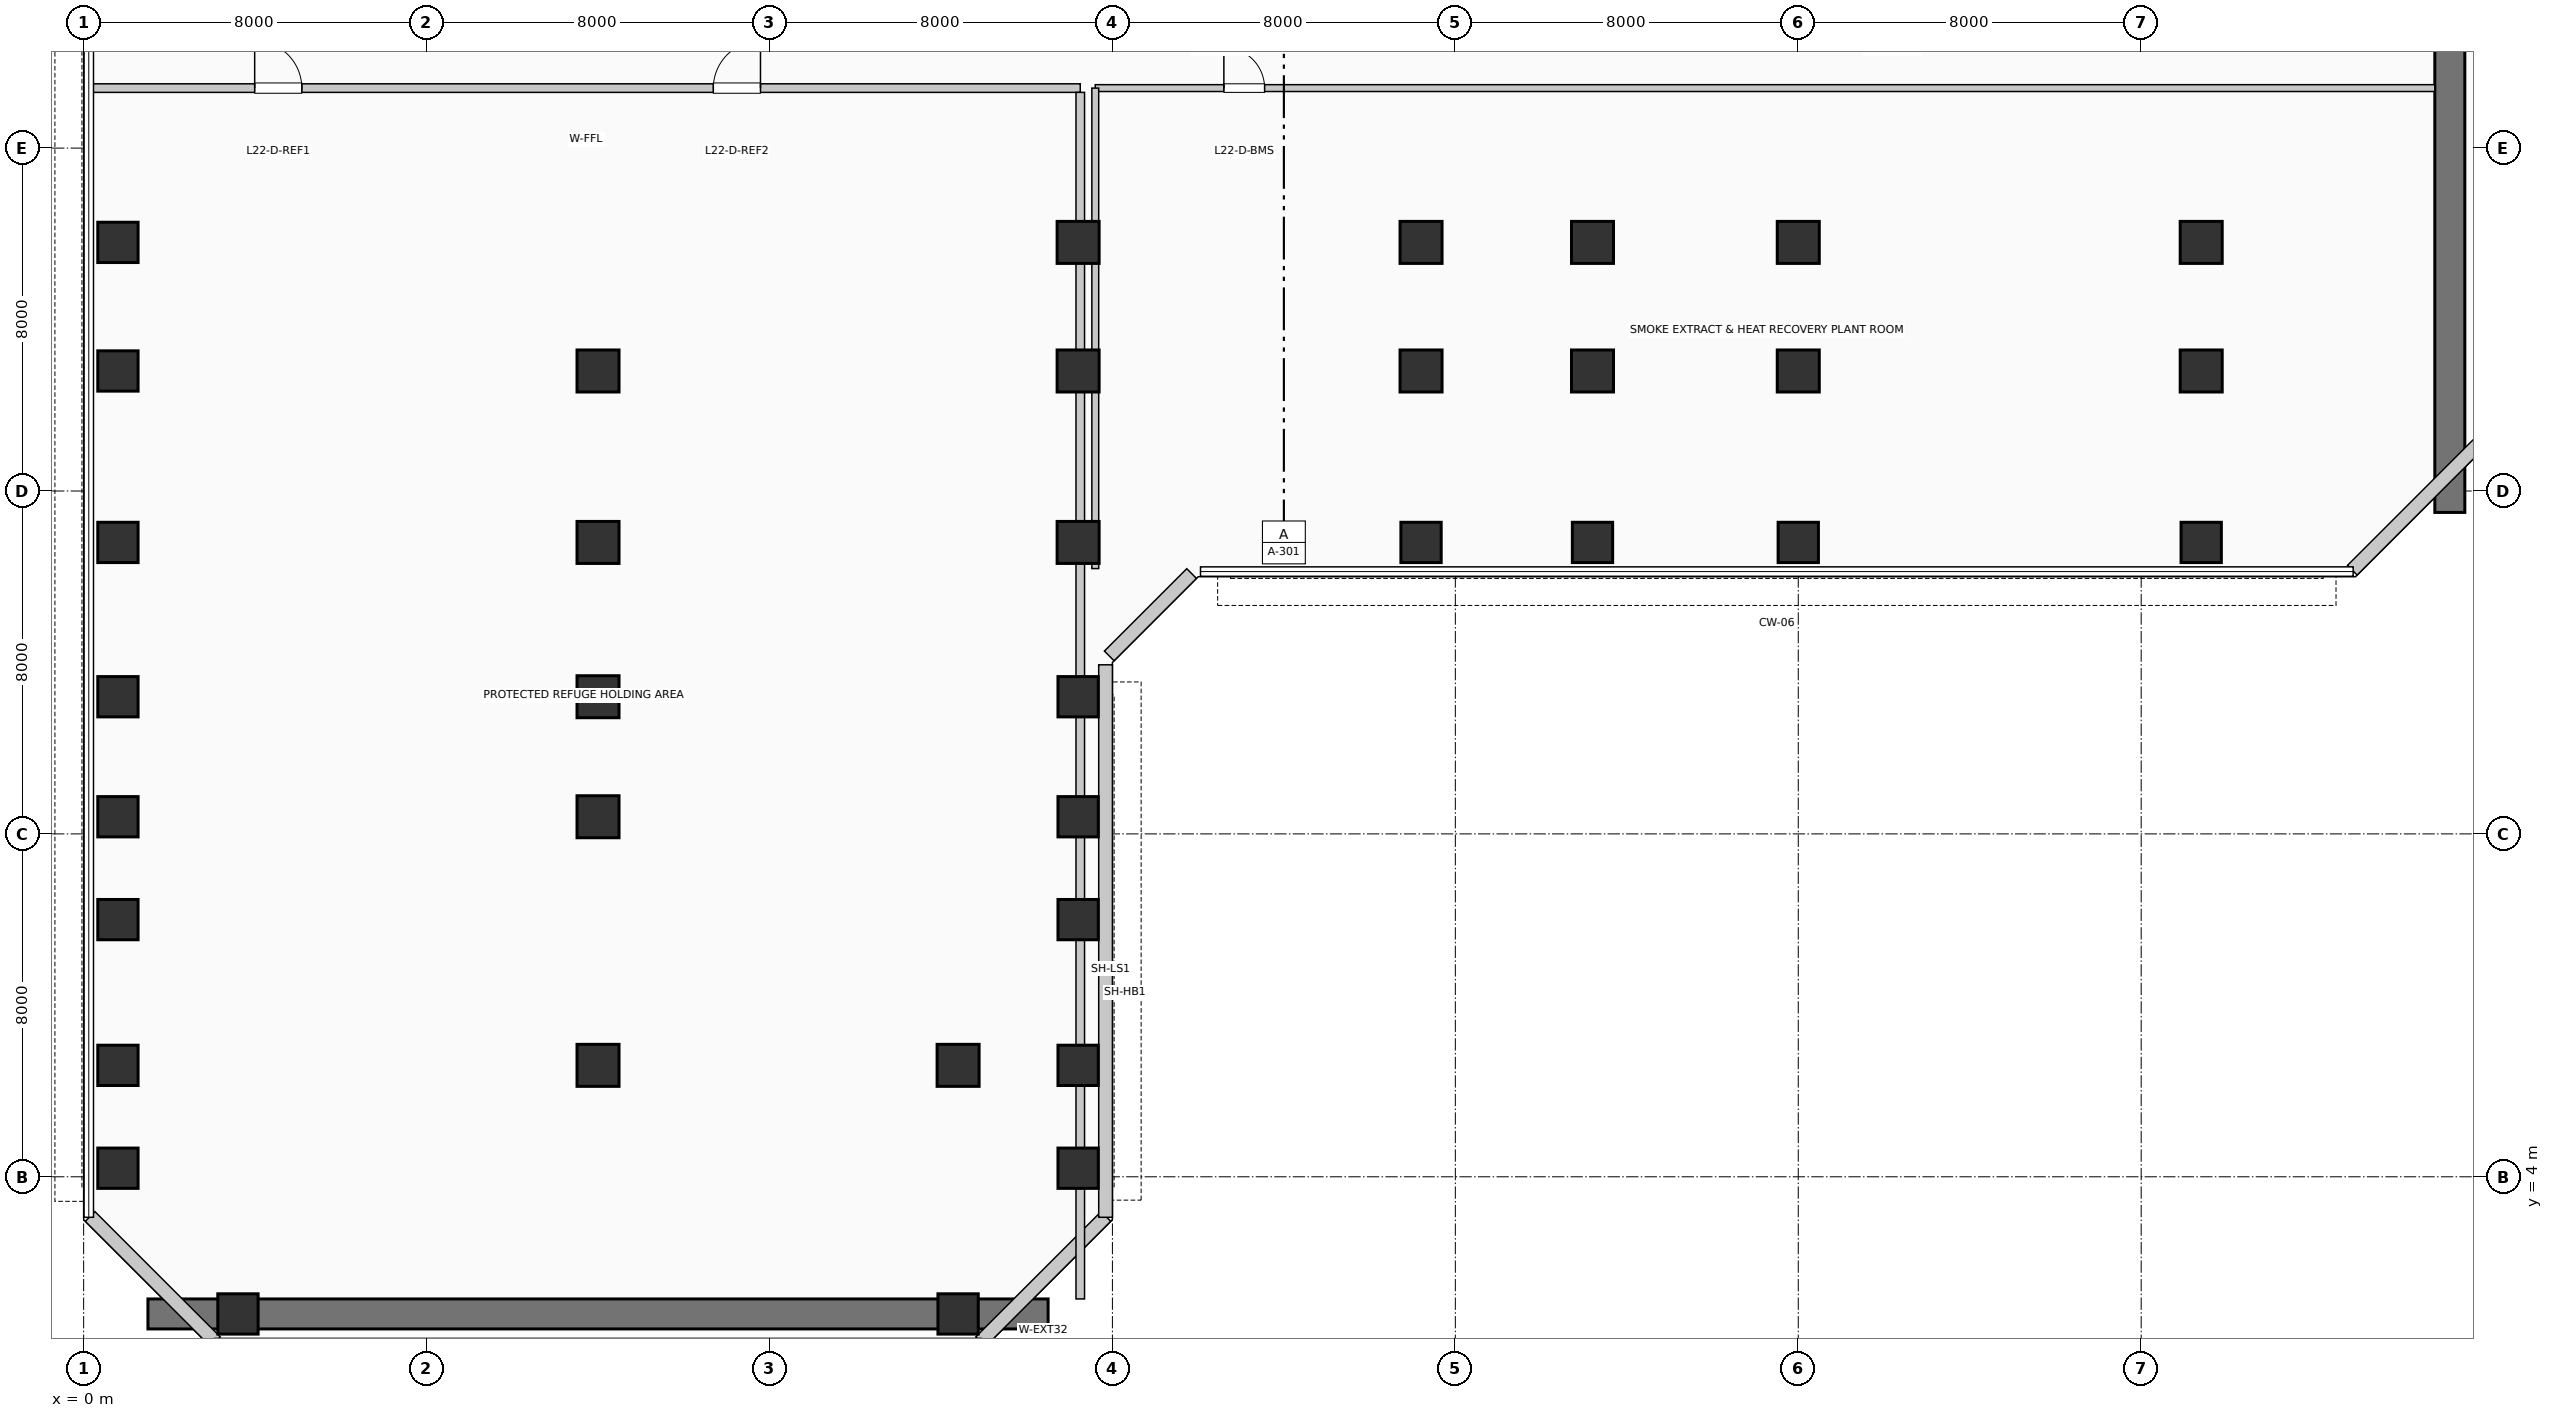
"""IFC4 building model, lengths in metres.
Left out: names, types, materials, properties, quantities, classifications, styles, units other than length and angle.
Written with IfcOpenShell. Run it as: python <this file> out.ifc"""

import sys

from ifc_helpers import new_model, si_unit, direction, frame, frame_2d, origin, origin_2d, place, context, subcontext, project, spatial, rectangle, extrude, element, fill, save


model = new_model("IFC4")
c1 = context("Model", 3, precision=1e-05, world=origin(), true_north=direction((0.0, 1.0)))
c2 = subcontext(c1, "Body", "Model", "MODEL_VIEW")
j1 = project(units=[si_unit("LENGTHUNIT", "METRE"), si_unit("PLANEANGLEUNIT", "RADIAN")], contexts=[c1])
p1 = place(None, origin())
s1 = spatial("IfcSite", under=j1, at=p1, CompositionType="ELEMENT")
p2 = place(p1, origin())
s2 = spatial("IfcBuilding", under=s1, at=p2, CompositionType="ELEMENT")
p3 = place(p2, frame((0.0, 0.0, 93.72)))
s3 = spatial("IfcBuildingStorey", under=s2, at=p3, CompositionType="ELEMENT", Elevation=93.72)
p4 = place(p3, frame((1.5, 0.8, 0.0), z_axis=(0.0, 0.0, 1.0), x_axis=(1.0, 0.0, 0.0)))
e1 = element("IfcWall", 1, at=p4, inside=s3, PredefinedType="SHEAR", context=c2, shape_type="SweptSolid", body=[
    extrude(rectangle(XDim=21.0, YDim=0.7, at=frame_2d((10.5, 0.0))), origin(), (0.0, 0.0, 1.0), 4.3),
])
p5 = place(p3, frame((55.2, 19.5, 0.0), z_axis=(0.0, 0.0, 1.0), x_axis=(0.0, 1.0, 0.0)))
e2 = element("IfcWall", 2, at=p5, inside=s3, PredefinedType="SHEAR", context=c2, shape_type="SweptSolid", body=[
    extrude(rectangle(XDim=24.9, YDim=0.7, at=frame_2d((12.45, 0.0))), origin(), (0.0, 0.0, 1.0), 4.3),
])
for number, where, z_axis, x_axis in (
    (3, (0.8, 4.2, 0.0), (0.0, 0.0, 1.0), (1.0, 0.0, 0.0)),
    (4, (0.8, 6.6, 0.0), (0.0, 0.0, 1.0), (1.0, 0.0, 0.0)),
    (5, (0.8, 10.0, 0.0), (0.0, 0.0, 1.0), (1.0, 0.0, 0.0)),
    (6, (0.8, 12.4, 0.0), (0.0, 0.0, 1.0), (1.0, 0.0, 0.0)),
    (7, (0.8, 15.2, 0.0), (0.0, 0.0, 1.0), (1.0, 0.0, 0.0)),
    (8, (0.8, 18.8, 0.0), (0.0, 0.0, 1.0), (1.0, 0.0, 0.0)),
    (9, (0.8, 22.8, 0.0), (0.0, 0.0, 1.0), (1.0, 0.0, 0.0)),
    (10, (0.8, 25.8, 0.0), (0.0, 0.0, 1.0), (1.0, 0.0, 0.0)),
    (11, (3.6, 0.8, 0.0), (0.0, 0.0, 1.0), (1.0, 0.0, 0.0)),
):
    element("IfcColumn", number, at=place(p3, frame(where, z_axis=z_axis, x_axis=x_axis)), inside=s3, PredefinedType="COLUMN", context=c2, shape_type="SweptSolid", body=[
        extrude(rectangle(XDim=0.94, YDim=0.94, at=origin_2d()), origin(), (0.0, 0.0, 1.0), 4.95),
    ])
for number, where, z_axis, x_axis in (
    (12, (12.0, 6.6, 0.0), (0.0, 0.0, 1.0), (1.0, 0.0, 0.0)),
    (13, (12.0, 12.4, 0.0), (0.0, 0.0, 1.0), (1.0, 0.0, 0.0)),
    (14, (12.0, 15.2, 0.0), (0.0, 0.0, 1.0), (1.0, 0.0, 0.0)),
    (15, (12.0, 18.8, 0.0), (0.0, 0.0, 1.0), (1.0, 0.0, 0.0)),
    (16, (12.0, 22.8, 0.0), (0.0, 0.0, 1.0), (1.0, 0.0, 0.0)),
):
    element("IfcColumn", number, at=place(p3, frame(where, z_axis=z_axis, x_axis=x_axis)), inside=s3, PredefinedType="COLUMN", context=c2, shape_type="SweptSolid", body=[
        extrude(rectangle(XDim=0.98, YDim=0.98, at=origin_2d()), origin(), (0.0, 0.0, 1.0), 4.95),
    ])
p6 = place(p3, frame((20.4, 0.8, 0.0), z_axis=(0.0, 0.0, 1.0), x_axis=(1.0, 0.0, 0.0)))
e17 = element("IfcColumn", 17, at=p6, inside=s3, PredefinedType="COLUMN", context=c2, shape_type="SweptSolid", body=[
    extrude(rectangle(XDim=0.94, YDim=0.94, at=origin_2d()), origin(), (0.0, 0.0, 1.0), 4.95),
])
p7 = place(p3, frame((20.4, 6.6, 0.0), z_axis=(0.0, 0.0, 1.0), x_axis=(1.0, 0.0, 0.0)))
e18 = element("IfcColumn", 18, at=p7, inside=s3, PredefinedType="COLUMN", context=c2, shape_type="SweptSolid", body=[
    extrude(rectangle(XDim=0.98, YDim=0.98, at=origin_2d()), origin(), (0.0, 0.0, 1.0), 4.95),
])
for number, where, z_axis, x_axis in (
    (19, (23.2, 4.2, 0.0), (0.0, 0.0, 1.0), (1.0, 0.0, 0.0)),
    (20, (23.2, 6.6, 0.0), (0.0, 0.0, 1.0), (1.0, 0.0, 0.0)),
    (21, (23.2, 10.0, 0.0), (0.0, 0.0, 1.0), (1.0, 0.0, 0.0)),
    (22, (23.2, 12.4, 0.0), (0.0, 0.0, 1.0), (1.0, 0.0, 0.0)),
    (23, (23.2, 15.2, 0.0), (0.0, 0.0, 1.0), (1.0, 0.0, 0.0)),
):
    element("IfcColumn", number, at=place(p3, frame(where, z_axis=z_axis, x_axis=x_axis)), inside=s3, PredefinedType="COLUMN", context=c2, shape_type="SweptSolid", body=[
        extrude(rectangle(XDim=0.94, YDim=0.94, at=origin_2d()), origin(), (0.0, 0.0, 1.0), 4.95),
    ])
for number, where, z_axis, x_axis in (
    (24, (23.2, 18.8, 0.0), (0.0, 0.0, 1.0), (1.0, 0.0, 0.0)),
    (25, (23.2, 22.8, 0.0), (0.0, 0.0, 1.0), (1.0, 0.0, 0.0)),
    (26, (23.2, 25.8, 0.0), (0.0, 0.0, 1.0), (1.0, 0.0, 0.0)),
):
    element("IfcColumn", number, at=place(p3, frame(where, z_axis=z_axis, x_axis=x_axis)), inside=s3, PredefinedType="COLUMN", context=c2, shape_type="SweptSolid", body=[
        extrude(rectangle(XDim=0.98, YDim=0.98, at=origin_2d()), origin(), (0.0, 0.0, 1.0), 4.95),
    ])
p8 = place(p3, frame((31.2, 18.8, 0.0), z_axis=(0.0, 0.0, 1.0), x_axis=(1.0, 0.0, 0.0)))
e27 = element("IfcColumn", 27, at=p8, inside=s3, PredefinedType="COLUMN", context=c2, shape_type="SweptSolid", body=[
    extrude(rectangle(XDim=0.94, YDim=0.94, at=origin_2d()), origin(), (0.0, 0.0, 1.0), 4.95),
])
for number, where, z_axis, x_axis in (
    (28, (31.2, 22.8, 0.0), (0.0, 0.0, 1.0), (1.0, 0.0, 0.0)),
    (29, (31.2, 25.8, 0.0), (0.0, 0.0, 1.0), (1.0, 0.0, 0.0)),
):
    element("IfcColumn", number, at=place(p3, frame(where, z_axis=z_axis, x_axis=x_axis)), inside=s3, PredefinedType="COLUMN", context=c2, shape_type="SweptSolid", body=[
        extrude(rectangle(XDim=0.98, YDim=0.98, at=origin_2d()), origin(), (0.0, 0.0, 1.0), 4.95),
    ])
p9 = place(p3, frame((35.2, 18.8, 0.0), z_axis=(0.0, 0.0, 1.0), x_axis=(1.0, 0.0, 0.0)))
e30 = element("IfcColumn", 30, at=p9, inside=s3, PredefinedType="COLUMN", context=c2, shape_type="SweptSolid", body=[
    extrude(rectangle(XDim=0.94, YDim=0.94, at=origin_2d()), origin(), (0.0, 0.0, 1.0), 4.95),
])
for number, where, z_axis, x_axis in (
    (31, (35.2, 22.8, 0.0), (0.0, 0.0, 1.0), (1.0, 0.0, 0.0)),
    (32, (35.2, 25.8, 0.0), (0.0, 0.0, 1.0), (1.0, 0.0, 0.0)),
):
    element("IfcColumn", number, at=place(p3, frame(where, z_axis=z_axis, x_axis=x_axis)), inside=s3, PredefinedType="COLUMN", context=c2, shape_type="SweptSolid", body=[
        extrude(rectangle(XDim=0.98, YDim=0.98, at=origin_2d()), origin(), (0.0, 0.0, 1.0), 4.95),
    ])
p10 = place(p3, frame((40.0, 18.8, 0.0), z_axis=(0.0, 0.0, 1.0), x_axis=(1.0, 0.0, 0.0)))
e33 = element("IfcColumn", 33, at=p10, inside=s3, PredefinedType="COLUMN", context=c2, shape_type="SweptSolid", body=[
    extrude(rectangle(XDim=0.94, YDim=0.94, at=origin_2d()), origin(), (0.0, 0.0, 1.0), 4.95),
])
for number, where, z_axis, x_axis in (
    (34, (40.0, 22.8, 0.0), (0.0, 0.0, 1.0), (1.0, 0.0, 0.0)),
    (35, (40.0, 25.8, 0.0), (0.0, 0.0, 1.0), (1.0, 0.0, 0.0)),
):
    element("IfcColumn", number, at=place(p3, frame(where, z_axis=z_axis, x_axis=x_axis)), inside=s3, PredefinedType="COLUMN", context=c2, shape_type="SweptSolid", body=[
        extrude(rectangle(XDim=0.98, YDim=0.98, at=origin_2d()), origin(), (0.0, 0.0, 1.0), 4.95),
    ])
p11 = place(p3, frame((49.4, 18.8, 0.0), z_axis=(0.0, 0.0, 1.0), x_axis=(1.0, 0.0, 0.0)))
e36 = element("IfcColumn", 36, at=p11, inside=s3, PredefinedType="COLUMN", context=c2, shape_type="SweptSolid", body=[
    extrude(rectangle(XDim=0.94, YDim=0.94, at=origin_2d()), origin(), (0.0, 0.0, 1.0), 4.95),
])
for number, where, z_axis, x_axis in (
    (37, (49.4, 22.8, 0.0), (0.0, 0.0, 1.0), (1.0, 0.0, 0.0)),
    (38, (49.4, 25.8, 0.0), (0.0, 0.0, 1.0), (1.0, 0.0, 0.0)),
):
    element("IfcColumn", number, at=place(p3, frame(where, z_axis=z_axis, x_axis=x_axis)), inside=s3, PredefinedType="COLUMN", context=c2, shape_type="SweptSolid", body=[
        extrude(rectangle(XDim=0.98, YDim=0.98, at=origin_2d()), origin(), (0.0, 0.0, 1.0), 4.95),
    ])
p12 = place(p3, frame((20.926, 0.152, 0.0), z_axis=(0.0, 0.0, 1.0), x_axis=(0.707106781187, 0.707106781187, 0.0)))
e39 = element("IfcWall", 39, at=p12, inside=s3, PredefinedType="SOLIDWALL", context=c2, shape_type="SweptSolid", body=[
    extrude(rectangle(XDim=4.133, YDim=0.32, at=frame_2d((2.066, 0.0))), origin(), (0.0, 0.0, 1.0), 4.7),
])
p13 = place(p3, frame((23.84, 3.055, 0.0), z_axis=(0.0, 0.0, 1.0), x_axis=(0.0, 1.0, 0.0)))
e40 = element("IfcWall", 40, at=p13, inside=s3, PredefinedType="SOLIDWALL", context=c2, shape_type="SweptSolid", body=[
    extrude(rectangle(XDim=12.89, YDim=0.32, at=frame_2d((6.445, 0.0))), origin(), (0.0, 0.0, 1.0), 4.7),
])
p14 = place(p3, frame((23.926, 16.152, 0.0), z_axis=(0.0, 0.0, 1.0), x_axis=(0.707106781187, 0.707106781187, 0.0)))
e41 = element("IfcWall", 41, at=p14, inside=s3, PredefinedType="SOLIDWALL", context=c2, shape_type="SweptSolid", body=[
    extrude(rectangle(XDim=2.718, YDim=0.32, at=frame_2d((1.359, 0.0))), origin(), (0.0, 0.0, 1.0), 4.7),
])
for number, where, z_axis, x_axis in (
    (42, (52.926, 18.152, 0.0), (0.0, 0.0, 1.0), (0.707, 0.707, 0.0)),
    (43, (0.152, 3.074, 0.0), (0.0, 0.0, 1.0), (0.707, -0.707, 0.0)),
):
    element("IfcWall", number, at=place(p3, frame(where, z_axis=z_axis, x_axis=x_axis)), inside=s3, PredefinedType="SOLIDWALL", context=c2, shape_type="SweptSolid", body=[
        extrude(rectangle(XDim=4.133, YDim=0.32, at=frame_2d((2.066, 0.0))), origin(), (0.0, 0.0, 1.0), 4.7),
    ])
p15 = place(p3, frame((0.19, 29.4, 0.0), z_axis=(0.0, 0.0, 1.0), x_axis=(1.0, 0.0, 0.0)))
e44 = element("IfcWall", 44, at=p15, inside=s3, PredefinedType="PARTITIONING", context=c2, shape_type="SweptSolid", body=[
    extrude(rectangle(XDim=23.06, YDim=0.2, at=frame_2d((11.53, 0.0))), origin(), (0.0, 0.0, 1.0), 4.355),
])
p16 = place(p15, frame((3.8, 0.0, 0.0)))
e45 = element("IfcOpeningElement", 45, at=p16, cuts=e44, PredefinedType="OPENING", context=c2, shape_type="SweptSolid", body=[
    extrude(rectangle(XDim=1.1, YDim=2.15, at=frame_2d((0.55, 1.075))), frame((0.0, 0.11, 0.0), z_axis=(0.0, -1.0, 0.0), x_axis=(1.0, 0.0, 0.0)), (0.0, 0.0, 1.0), 0.22),
])
p17 = place(p15, frame((14.5, 0.0, 0.0)))
e46 = element("IfcOpeningElement", 46, at=p17, cuts=e44, PredefinedType="OPENING", context=c2, shape_type="SweptSolid", body=[
    extrude(rectangle(XDim=1.1, YDim=2.15, at=frame_2d((0.55, 1.075))), frame((0.0, 0.11, 0.0), z_axis=(0.0, -1.0, 0.0), x_axis=(1.0, 0.0, 0.0)), (0.0, 0.0, 1.0), 0.22),
])
p18 = place(p3, frame((23.25, 1.15, 0.0), z_axis=(0.0, 0.0, 1.0), x_axis=(0.0, 1.0, 0.0)))
e47 = element("IfcWall", 47, at=p18, inside=s3, PredefinedType="PARTITIONING", context=c2, shape_type="SweptSolid", body=[
    extrude(rectangle(XDim=28.15, YDim=0.2, at=frame_2d((14.075, 0.0))), origin(), (0.0, 0.0, 1.0), 3.985),
])
p19 = place(p3, frame((23.6, 29.4, 0.0), z_axis=(0.0, 0.0, 1.0), x_axis=(1.0, 0.0, 0.0)))
e48 = element("IfcWall", 48, at=p19, inside=s3, PredefinedType="PARTITIONING", context=c2, shape_type="SweptSolid", body=[
    extrude(rectangle(XDim=31.25, YDim=0.16, at=frame_2d((15.625, 0.0))), origin(), (0.0, 0.0, 1.0), 4.355),
])
p20 = place(p19, frame((3.0, 0.0, 0.0)))
e49 = element("IfcOpeningElement", 49, at=p20, cuts=e48, PredefinedType="OPENING", context=c2, shape_type="SweptSolid", body=[
    extrude(rectangle(XDim=0.95, YDim=2.1, at=frame_2d((0.475, 1.05))), frame((0.0, 0.09, 0.0), z_axis=(0.0, -1.0, 0.0), x_axis=(1.0, 0.0, 0.0)), (0.0, 0.0, 1.0), 0.18),
])
p21 = place(p3, frame((23.6, 18.19, 0.0), z_axis=(0.0, 0.0, 1.0), x_axis=(0.0, 1.0, 0.0)))
e50 = element("IfcWall", 50, at=p21, inside=s3, PredefinedType="PARTITIONING", context=c2, shape_type="SweptSolid", body=[
    extrude(rectangle(XDim=11.21, YDim=0.16, at=frame_2d((5.605, 0.0))), origin(), (0.0, 0.0, 1.0), 3.985),
])
p22 = place(p16, origin())
e51 = element("IfcDoor", 51, at=p22, inside=s3, OperationType="SINGLE_SWING_LEFT", PredefinedType="DOOR", context=c2, shape_type="SweptSolid", body=[
    extrude(rectangle(XDim=1.1, YDim=2.15, at=frame_2d((0.55, 1.075))), frame((0.0, 0.025, 0.0), z_axis=(0.0, -1.0, 0.0), x_axis=(1.0, 0.0, 0.0)), (0.0, 0.0, 1.0), 0.05),
])
fill(e45, e51)
p23 = place(p17, origin())
e52 = element("IfcDoor", 52, at=p23, inside=s3, OperationType="SINGLE_SWING_RIGHT", PredefinedType="DOOR", context=c2, shape_type="SweptSolid", body=[
    extrude(rectangle(XDim=1.1, YDim=2.15, at=frame_2d((0.55, 1.075))), frame((0.0, 0.025, 0.0), z_axis=(0.0, -1.0, 0.0), x_axis=(1.0, 0.0, 0.0)), (0.0, 0.0, 1.0), 0.05),
])
fill(e46, e52)
p24 = place(p20, origin())
e53 = element("IfcDoor", 53, at=p24, inside=s3, OperationType="SINGLE_SWING_LEFT", PredefinedType="DOOR", context=c2, shape_type="SweptSolid", body=[
    extrude(rectangle(XDim=0.95, YDim=2.1, at=frame_2d((0.475, 1.05))), frame((0.0, 0.025, 0.0), z_axis=(0.0, -1.0, 0.0), x_axis=(1.0, 0.0, 0.0)), (0.0, 0.0, 1.0), 0.05),
])
fill(e49, e53)
save(model, sys.argv[1])
